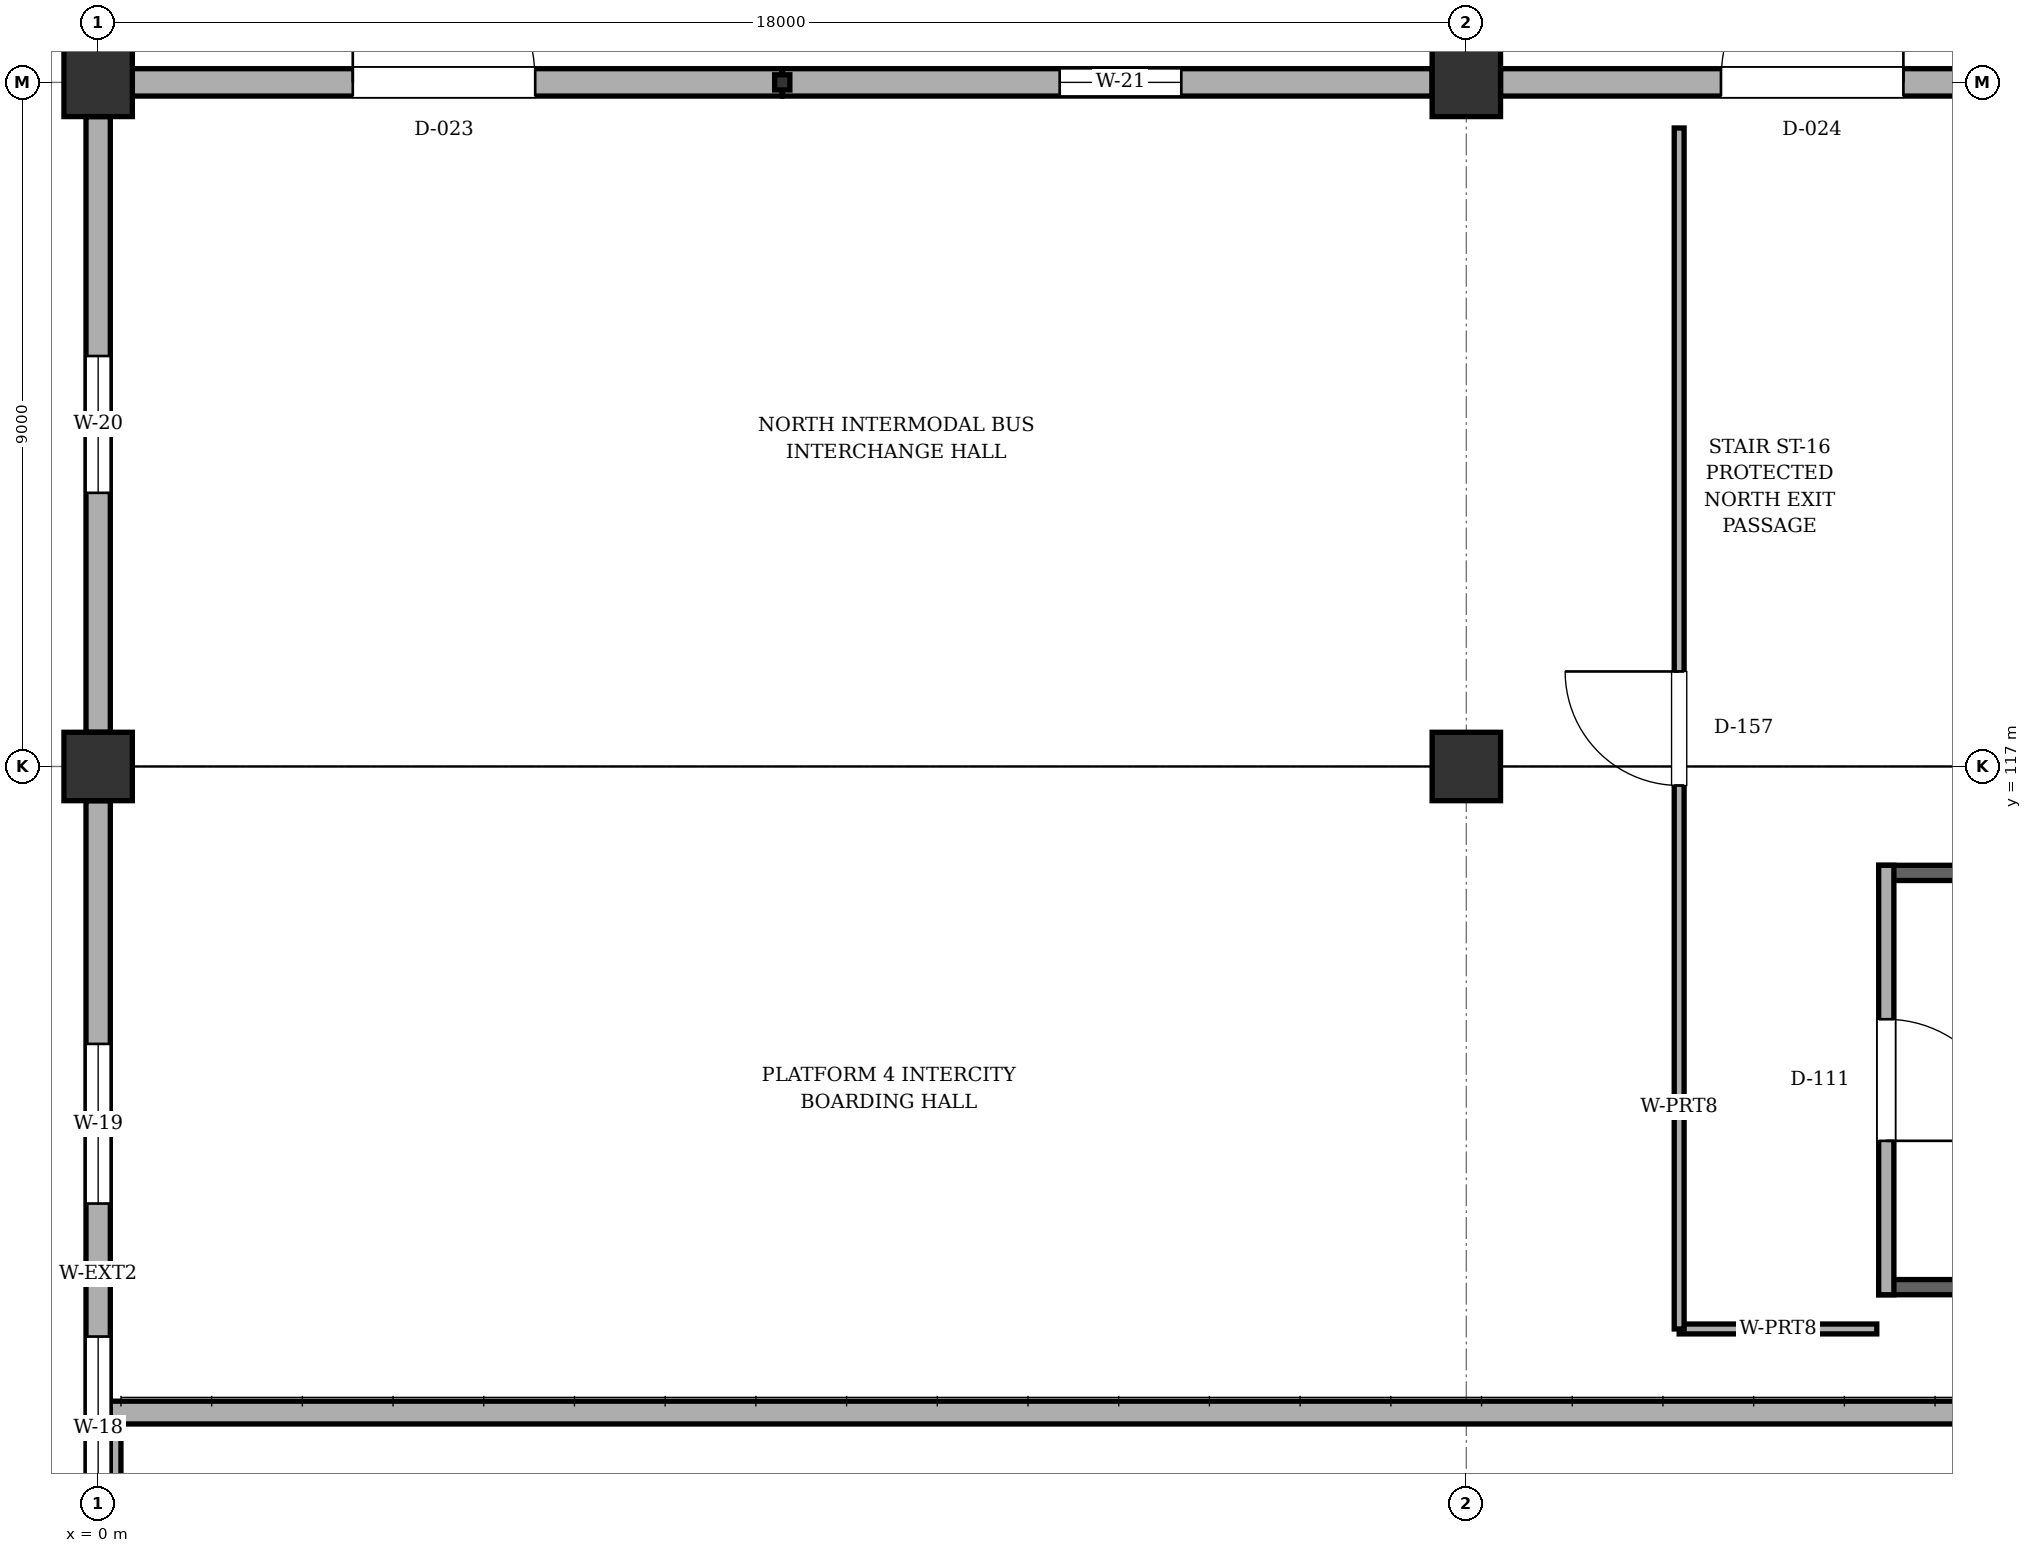
"""IFC4 building model, lengths in metres.
Left out: names, types, materials, properties, quantities, classifications, styles, units other than length and angle.
Written with IfcOpenShell. Run it as: python <this file> out.ifc"""

import sys

from ifc_helpers import new_model, si_unit, direction, frame, frame_2d, origin, origin_2d, place, context, subcontext, project, spatial, rectangle, i_section, extrude, element, fill, save


model = new_model("IFC4")
c1 = context("Model", 3, precision=1e-05, world=origin(), true_north=direction((0.0, 1.0)))
c2 = subcontext(c1, "Body", "Model", "MODEL_VIEW")
j1 = project(units=[si_unit("LENGTHUNIT", "METRE"), si_unit("PLANEANGLEUNIT", "RADIAN")], contexts=[c1])
p1 = place(None, origin())
s1 = spatial("IfcSite", under=j1, at=p1, CompositionType="ELEMENT")
p2 = place(p1, origin())
s2 = spatial("IfcBuilding", under=s1, at=p2, CompositionType="ELEMENT")
p3 = place(p2, origin())
s3 = spatial("IfcBuildingStorey", under=s2, at=p3, CompositionType="ELEMENT", Elevation=0.0)
for number, where, z_axis, x_axis in (
    (1, (0.0, 117.0, 0.0), (0.0, 0.0, 1.0), (1.0, 0.0, 0.0)),
    (2, (0.0, 126.0, 0.0), (0.0, 0.0, 1.0), (1.0, 0.0, 0.0)),
    (3, (18.0, 117.0, 0.0), (0.0, 0.0, 1.0), (1.0, 0.0, 0.0)),
    (4, (18.0, 126.0, 0.0), (0.0, 0.0, 1.0), (1.0, 0.0, 0.0)),
):
    element("IfcColumn", number, at=place(p3, frame(where, z_axis=z_axis, x_axis=x_axis)), inside=s3, PredefinedType="COLUMN", context=c2, shape_type="SweptSolid", body=[
        extrude(rectangle(XDim=0.9, YDim=0.9, at=origin_2d()), origin(), (0.0, 0.0, 1.0), 6.6),
    ])
p4 = place(p3, frame((9.0, 126.0, 0.0), z_axis=(0.0, 0.0, 1.0), x_axis=(1.0, 0.0, 0.0)))
e5 = element("IfcColumn", 5, at=p4, inside=s3, PredefinedType="PILASTER", context=c2, shape_type="SweptSolid", body=[
    extrude(i_section(OverallWidth=0.2, OverallDepth=0.2, WebThickness=0.008, FlangeThickness=0.012, FilletRadius=0.013, at=origin_2d()), origin(), (0.0, 0.0, 1.0), 6.28),
])
p5 = place(p3, frame((0.15, 104.5, -1.25), z_axis=(0.0, 0.0, 1.0), x_axis=(0.0, 1.0, 0.0)))
e6 = element("IfcWall", 6, at=p5, inside=s3, PredefinedType="SOLIDWALL", context=c2, shape_type="SweptSolid", body=[
    extrude(rectangle(XDim=4.0, YDim=0.3, at=frame_2d((2.0, 0.0))), origin(), (0.0, 0.0, 1.0), 1.23),
])
p6 = place(p3, frame((0.15, 108.5, -1.25), z_axis=(0.0, 0.0, 1.0), x_axis=(1.0, 0.0, 0.0)))
e7 = element("IfcWall", 7, at=p6, inside=s3, PredefinedType="SOLIDWALL", context=c2, shape_type="SweptSolid", body=[
    extrude(rectangle(XDim=107.7, YDim=0.3, at=frame_2d((53.85, 0.0))), origin(), (0.0, 0.0, 1.0), 0.87),
])
p7 = place(p3, frame((0.0, 104.1, 0.0), z_axis=(0.0, 0.0, 1.0), x_axis=(0.0, 1.0, 0.0)))
e8 = element("IfcWall", 8, at=p7, inside=s3, PredefinedType="SOLIDWALL", context=c2, shape_type="SweptSolid", body=[
    extrude(rectangle(XDim=12.45, YDim=0.32, at=frame_2d((6.225, 0.0))), origin(), (0.0, 0.0, 1.0), 5.495),
])
p8 = place(p7, frame((3.0, 0.0, 0.95)))
e9 = element("IfcOpeningElement", 9, at=p8, cuts=e8, PredefinedType="OPENING", context=c2, shape_type="SweptSolid", body=[
    extrude(rectangle(XDim=2.4, YDim=2.1, at=frame_2d((1.2, 1.05))), frame((0.0, 0.17, 0.0), z_axis=(0.0, -1.0, 0.0), x_axis=(1.0, 0.0, 0.0)), (0.0, 0.0, 1.0), 0.34),
])
p9 = place(p7, frame((7.15, 0.0, 0.95)))
e10 = element("IfcOpeningElement", 10, at=p9, cuts=e8, PredefinedType="OPENING", context=c2, shape_type="SweptSolid", body=[
    extrude(rectangle(XDim=2.1, YDim=2.0, at=frame_2d((1.05, 1.0))), frame((0.0, 0.17, 0.0), z_axis=(0.0, -1.0, 0.0), x_axis=(1.0, 0.0, 0.0)), (0.0, 0.0, 1.0), 0.34),
])
p10 = place(p3, frame((0.0, 117.45, 0.0), z_axis=(0.0, 0.0, 1.0), x_axis=(0.0, 1.0, 0.0)))
e11 = element("IfcWall", 11, at=p10, inside=s3, PredefinedType="SOLIDWALL", context=c2, shape_type="SweptSolid", body=[
    extrude(rectangle(XDim=8.1, YDim=0.32, at=frame_2d((4.05, 0.0))), origin(), (0.0, 0.0, 1.0), 5.67),
])
p11 = place(p10, frame((3.15, 0.0, 0.95)))
e12 = element("IfcOpeningElement", 12, at=p11, cuts=e11, PredefinedType="OPENING", context=c2, shape_type="SweptSolid", body=[
    extrude(rectangle(XDim=1.8, YDim=2.0, at=frame_2d((0.9, 1.0))), frame((0.0, 0.17, 0.0), z_axis=(0.0, -1.0, 0.0), x_axis=(1.0, 0.0, 0.0)), (0.0, 0.0, 1.0), 0.34),
])
p12 = place(p3, frame((0.45, 126.0, 0.0), z_axis=(0.0, 0.0, 1.0), x_axis=(1.0, 0.0, 0.0)))
e13 = element("IfcWall", 13, at=p12, inside=s3, PredefinedType="SOLIDWALL", context=c2, shape_type="SweptSolid", body=[
    extrude(rectangle(XDim=8.546, YDim=0.36, at=frame_2d((4.273, 0.0))), origin(), (0.0, 0.0, 1.0), 5.79),
])
p13 = place(p12, frame((2.9, 0.0, 0.0)))
e14 = element("IfcOpeningElement", 14, at=p13, cuts=e13, PredefinedType="OPENING", context=c2, shape_type="SweptSolid", body=[
    extrude(rectangle(XDim=2.4, YDim=2.5, at=frame_2d((1.2, 1.25))), frame((0.0, 0.19, 0.0), z_axis=(0.0, -1.0, 0.0), x_axis=(1.0, 0.0, 0.0)), (0.0, 0.0, 1.0), 0.38),
])
p14 = place(p3, frame((9.004, 126.0, 0.0), z_axis=(0.0, 0.0, 1.0), x_axis=(1.0, 0.0, 0.0)))
e15 = element("IfcWall", 15, at=p14, inside=s3, PredefinedType="SOLIDWALL", context=c2, shape_type="SweptSolid", body=[
    extrude(rectangle(XDim=8.546, YDim=0.36, at=frame_2d((4.273, 0.0))), origin(), (0.0, 0.0, 1.0), 5.79),
])
p15 = place(p14, frame((3.646, 0.0, 0.95)))
e16 = element("IfcOpeningElement", 16, at=p15, cuts=e15, PredefinedType="OPENING", context=c2, shape_type="SweptSolid", body=[
    extrude(rectangle(XDim=1.6, YDim=1.9, at=frame_2d((0.8, 0.95))), frame((0.0, 0.19, 0.0), z_axis=(0.0, -1.0, 0.0), x_axis=(1.0, 0.0, 0.0)), (0.0, 0.0, 1.0), 0.38),
])
p16 = place(p3, frame((18.45, 126.0, 0.0), z_axis=(0.0, 0.0, 1.0), x_axis=(1.0, 0.0, 0.0)))
e17 = element("IfcWall", 17, at=p16, inside=s3, PredefinedType="SOLIDWALL", context=c2, shape_type="SweptSolid", body=[
    extrude(rectangle(XDim=8.25, YDim=0.36, at=frame_2d((4.125, 0.0))), origin(), (0.0, 0.0, 1.0), 5.79),
])
p17 = place(p16, frame((2.9, 0.0, 0.0)))
e18 = element("IfcOpeningElement", 18, at=p17, cuts=e17, PredefinedType="OPENING", context=c2, shape_type="SweptSolid", body=[
    extrude(rectangle(XDim=2.4, YDim=2.5, at=frame_2d((1.2, 1.25))), frame((0.0, 0.19, 0.0), z_axis=(0.0, -1.0, 0.0), x_axis=(1.0, 0.0, 0.0)), (0.0, 0.0, 1.0), 0.38),
])
for number, where, z_axis, x_axis in (
    (19, (23.425, 110.15, 0.0), (0.0, 0.0, 1.0), (1.0, 0.0, 0.0)),
    (20, (35.25, 115.6, 0.0), (0.0, 0.0, 1.0), (-1.0, 0.0, 0.0)),
):
    element("IfcWall", number, at=place(p3, frame(where, z_axis=z_axis, x_axis=x_axis)), inside=s3, PredefinedType="SOLIDWALL", context=c2, shape_type="SweptSolid", body=[
        extrude(rectangle(XDim=11.825, YDim=0.2, at=frame_2d((5.913, 0.0))), origin(), (0.0, 0.0, 1.0), 6.32),
    ])
p18 = place(p3, frame((23.525, 115.7, 0.0), z_axis=(0.0, 0.0, 1.0), x_axis=(0.0, -1.0, 0.0)))
e21 = element("IfcWall", 21, at=p18, inside=s3, PredefinedType="SOLIDWALL", context=c2, shape_type="SweptSolid", body=[
    extrude(rectangle(XDim=5.65, YDim=0.2, at=frame_2d((2.825, 0.0))), origin(), (0.0, 0.0, 1.0), 4.4),
])
p19 = place(p18, frame((2.025, 0.0, 0.0)))
e22 = element("IfcOpeningElement", 22, at=p19, cuts=e21, PredefinedType="OPENING", context=c2, shape_type="SweptSolid", body=[
    extrude(rectangle(XDim=1.6, YDim=2.15, at=frame_2d((0.8, 1.075))), frame((0.0, 0.11, 0.0), z_axis=(0.0, -1.0, 0.0), x_axis=(1.0, 0.0, 0.0)), (0.0, 0.0, 1.0), 0.22),
])
p20 = place(p3, frame((23.4, 109.6, 0.0), z_axis=(0.0, 0.0, 1.0), x_axis=(-1.0, 0.0, 0.0)))
e23 = element("IfcWall", 23, at=p20, inside=s3, PredefinedType="PARTITIONING", context=c2, shape_type="SweptSolid", body=[
    extrude(rectangle(XDim=2.6, YDim=0.13, at=frame_2d((1.3, 0.0))), origin(), (0.0, 0.0, 1.0), 4.4),
])
p21 = place(p3, frame((20.8, 109.6, 0.0), z_axis=(0.0, 0.0, 1.0), x_axis=(0.0, 1.0, 0.0)))
e24 = element("IfcWall", 24, at=p21, inside=s3, PredefinedType="PARTITIONING", context=c2, shape_type="SweptSolid", body=[
    extrude(rectangle(XDim=15.8, YDim=0.13, at=frame_2d((7.9, 0.0))), origin(), (0.0, 0.0, 1.0), 4.4),
])
p22 = place(p21, frame((7.15, 0.0, 0.0)))
e25 = element("IfcOpeningElement", 25, at=p22, cuts=e24, PredefinedType="OPENING", context=c2, shape_type="SweptSolid", body=[
    extrude(rectangle(XDim=1.5, YDim=2.15, at=frame_2d((0.75, 1.075))), frame((0.0, 0.075, 0.0), z_axis=(0.0, -1.0, 0.0), x_axis=(1.0, 0.0, 0.0)), (0.0, 0.0, 1.0), 0.15),
])
p23 = place(p8, origin())
e26 = element("IfcWindow", 26, at=p23, inside=s3, PartitioningType="SINGLE_PANEL", PredefinedType="WINDOW", context=c2, shape_type="SweptSolid", body=[
    extrude(rectangle(XDim=2.4, YDim=2.1, at=frame_2d((1.2, 1.05))), frame((0.0, 0.03, 0.0), z_axis=(0.0, -1.0, 0.0), x_axis=(1.0, 0.0, 0.0)), (0.0, 0.0, 1.0), 0.06),
])
fill(e9, e26)
p24 = place(p9, origin())
e27 = element("IfcWindow", 27, at=p24, inside=s3, PartitioningType="SINGLE_PANEL", PredefinedType="WINDOW", context=c2, shape_type="SweptSolid", body=[
    extrude(rectangle(XDim=2.1, YDim=2.0, at=frame_2d((1.05, 1.0))), frame((0.0, 0.03, 0.0), z_axis=(0.0, -1.0, 0.0), x_axis=(1.0, 0.0, 0.0)), (0.0, 0.0, 1.0), 0.06),
])
fill(e10, e27)
p25 = place(p11, origin())
e28 = element("IfcWindow", 28, at=p25, inside=s3, PartitioningType="SINGLE_PANEL", PredefinedType="WINDOW", context=c2, shape_type="SweptSolid", body=[
    extrude(rectangle(XDim=1.8, YDim=2.0, at=frame_2d((0.9, 1.0))), frame((0.0, 0.03, 0.0), z_axis=(0.0, -1.0, 0.0), x_axis=(1.0, 0.0, 0.0)), (0.0, 0.0, 1.0), 0.06),
])
fill(e12, e28)
p26 = place(p13, origin())
e29 = element("IfcDoor", 29, at=p26, inside=s3, OperationType="SINGLE_SWING_LEFT", PredefinedType="DOOR", context=c2, shape_type="SweptSolid", body=[
    extrude(rectangle(XDim=2.4, YDim=2.5, at=frame_2d((1.2, 1.25))), frame((0.0, 0.025, 0.0), z_axis=(0.0, -1.0, 0.0), x_axis=(1.0, 0.0, 0.0)), (0.0, 0.0, 1.0), 0.05),
])
fill(e14, e29)
p27 = place(p15, origin())
e30 = element("IfcWindow", 30, at=p27, inside=s3, PartitioningType="SINGLE_PANEL", PredefinedType="WINDOW", context=c2, shape_type="SweptSolid", body=[
    extrude(rectangle(XDim=1.6, YDim=1.9, at=frame_2d((0.8, 0.95))), frame((0.0, 0.03, 0.0), z_axis=(0.0, -1.0, 0.0), x_axis=(1.0, 0.0, 0.0)), (0.0, 0.0, 1.0), 0.06),
])
fill(e16, e30)
p28 = place(p17, origin())
e31 = element("IfcDoor", 31, at=p28, inside=s3, OperationType="SINGLE_SWING_RIGHT", PredefinedType="DOOR", context=c2, shape_type="SweptSolid", body=[
    extrude(rectangle(XDim=2.4, YDim=2.5, at=frame_2d((1.2, 1.25))), frame((0.0, 0.025, 0.0), z_axis=(0.0, -1.0, 0.0), x_axis=(1.0, 0.0, 0.0)), (0.0, 0.0, 1.0), 0.05),
])
fill(e18, e31)
p29 = place(p19, origin())
e32 = element("IfcDoor", 32, at=p29, inside=s3, OperationType="SINGLE_SWING_RIGHT", PredefinedType="DOOR", context=c2, shape_type="SweptSolid", body=[
    extrude(rectangle(XDim=1.6, YDim=2.15, at=frame_2d((0.8, 1.075))), frame((0.0, 0.025, 0.0), z_axis=(0.0, -1.0, 0.0), x_axis=(1.0, 0.0, 0.0)), (0.0, 0.0, 1.0), 0.05),
])
fill(e22, e32)
p30 = place(p22, origin())
e33 = element("IfcDoor", 33, at=p30, inside=s3, OperationType="SINGLE_SWING_RIGHT", PredefinedType="DOOR", context=c2, shape_type="SweptSolid", body=[
    extrude(rectangle(XDim=1.5, YDim=2.15, at=frame_2d((0.75, 1.075))), frame((0.0, 0.025, 0.0), z_axis=(0.0, -1.0, 0.0), x_axis=(1.0, 0.0, 0.0)), (0.0, 0.0, 1.0), 0.05),
])
fill(e25, e33)
save(model, sys.argv[1])
